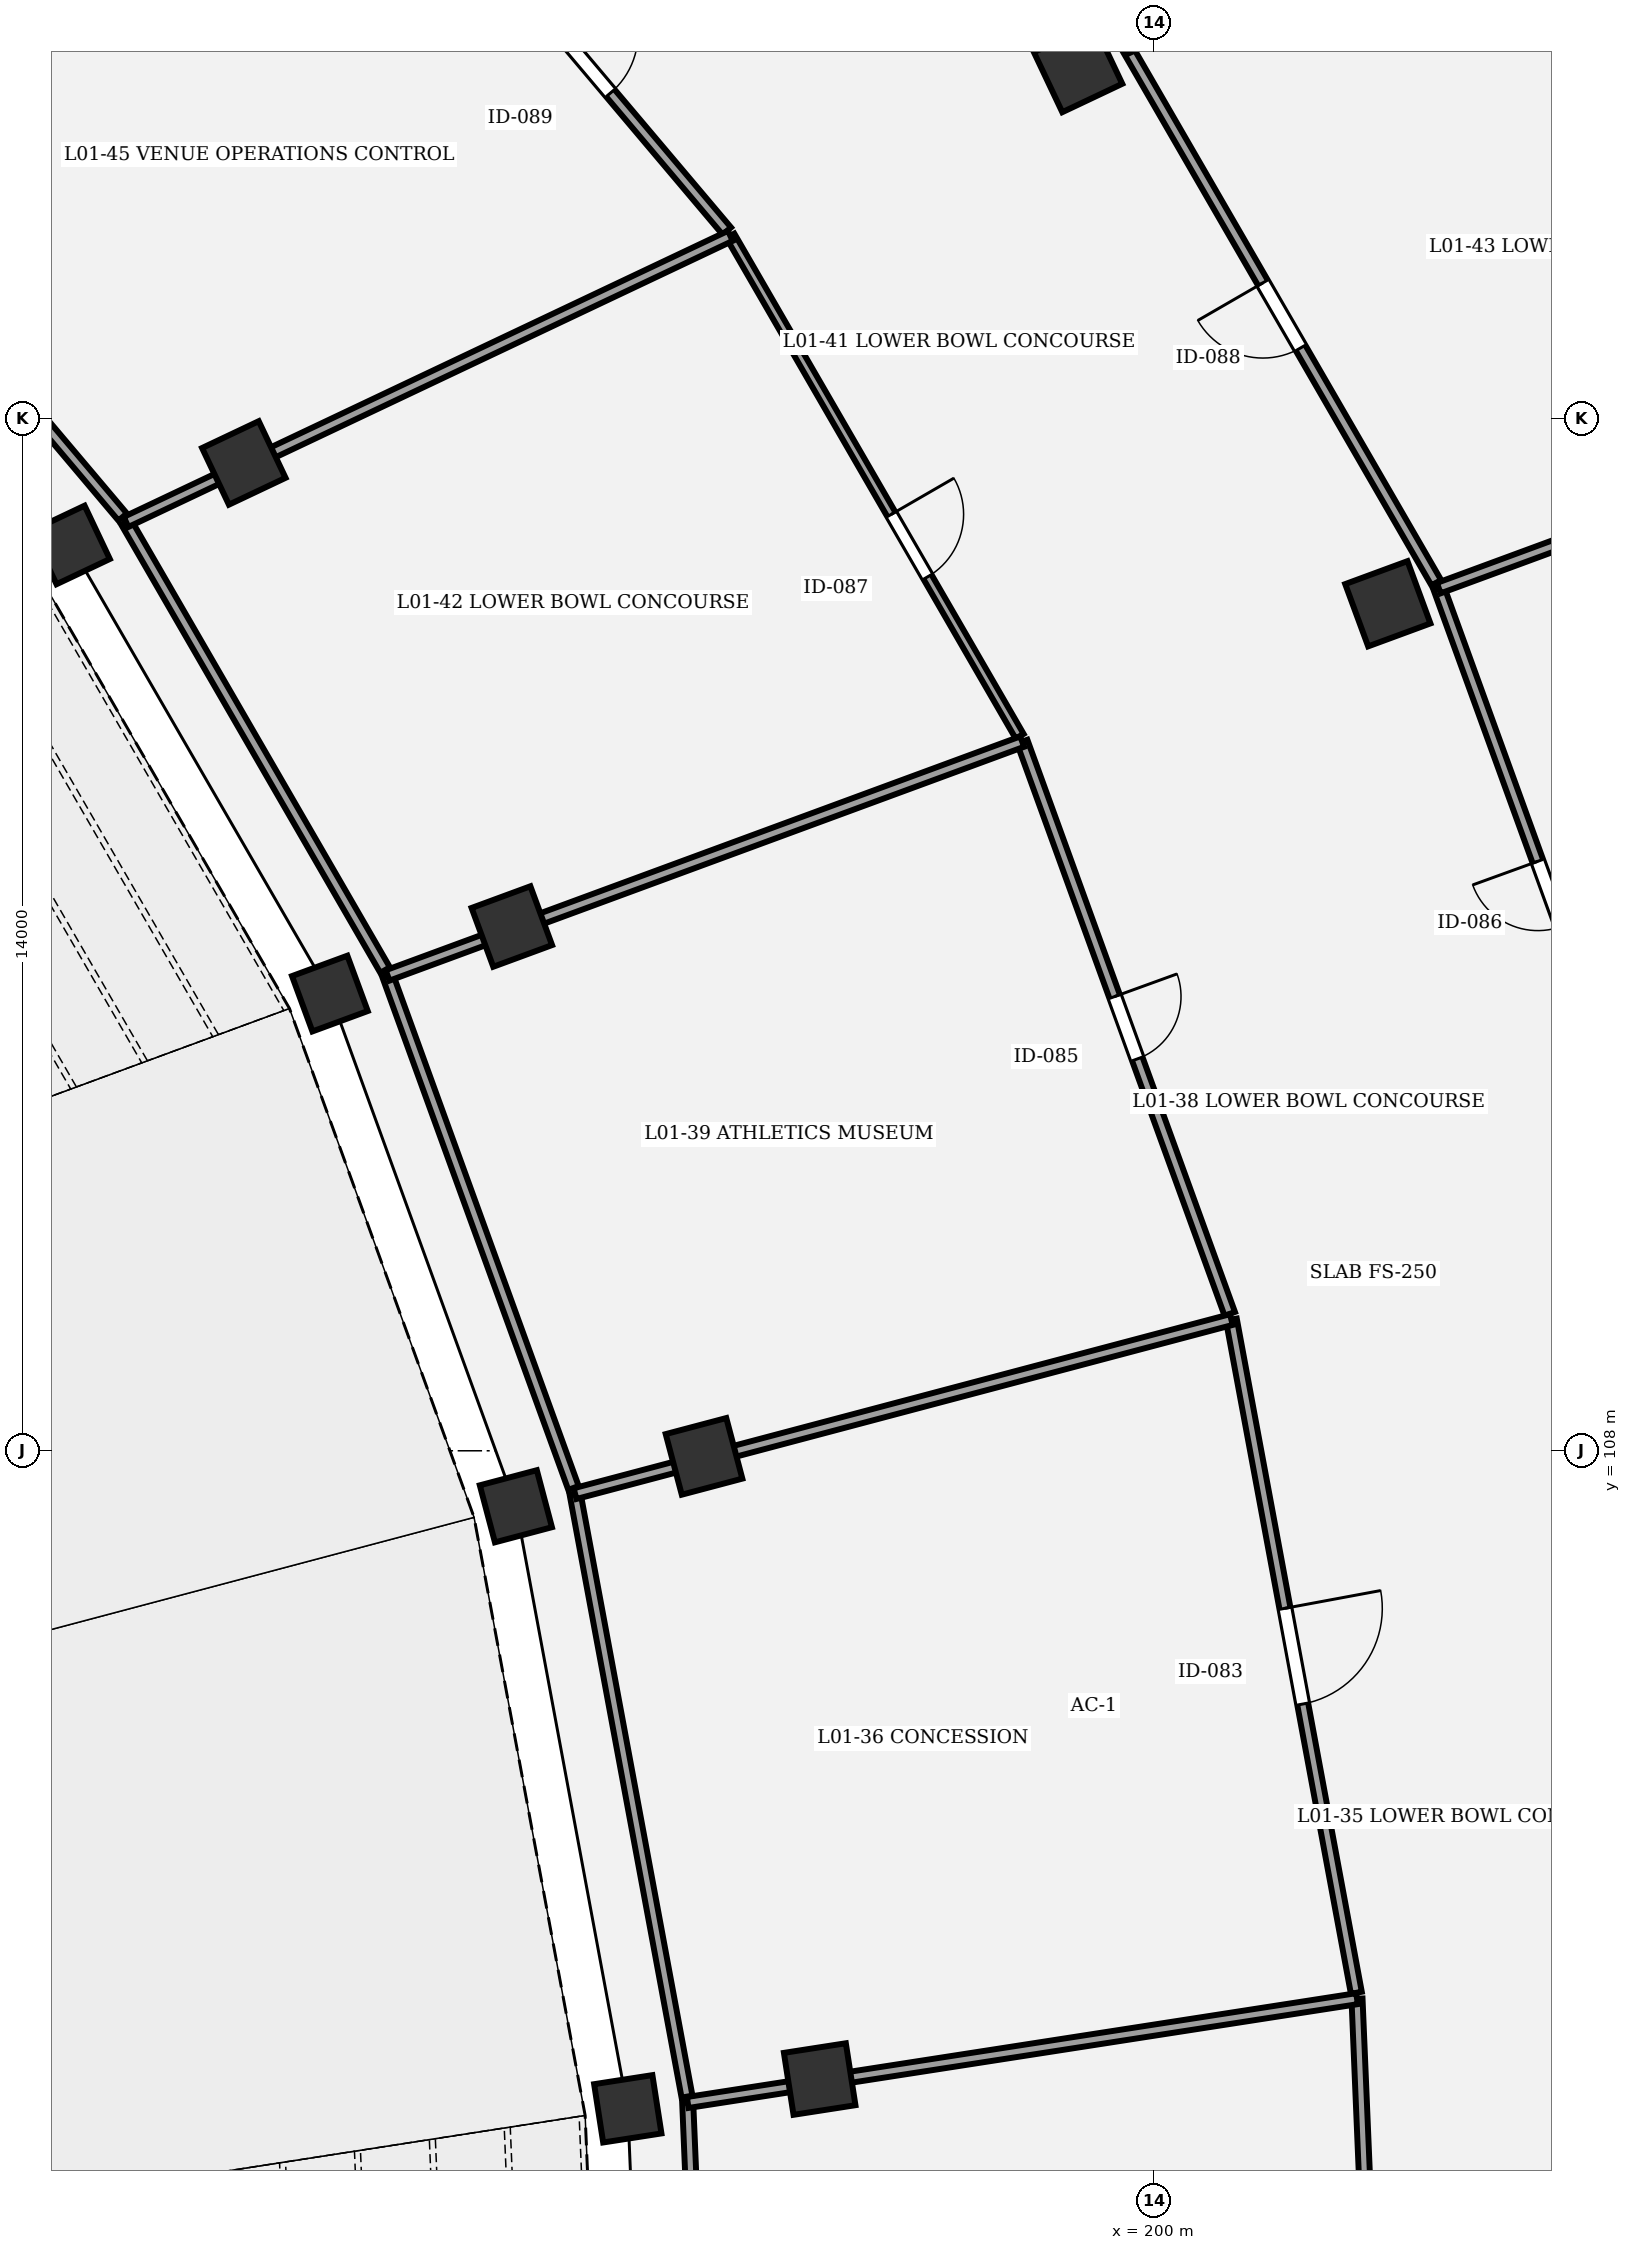
"""IFC4 building model, lengths in metres.
Left out: names, types, materials, properties, quantities, classifications, styles, units other than length and angle.
Written with IfcOpenShell. Run it as: python <this file> out.ifc"""

import sys

from ifc_helpers import new_model, si_unit, direction, frame, frame_2d, origin, origin_2d, place, context, subcontext, project, spatial, rectangle, extrude, element, fill, save


model = new_model("IFC4")
c1 = context("Model", 3, precision=1e-05, world=origin(), true_north=direction((0.0, 1.0)))
c2 = subcontext(c1, "Body", "Model", "MODEL_VIEW")
j1 = project(units=[si_unit("LENGTHUNIT", "METRE"), si_unit("PLANEANGLEUNIT", "RADIAN")], contexts=[c1])
p1 = place(None, origin())
s1 = spatial("IfcSite", under=j1, at=p1, CompositionType="ELEMENT")
p2 = place(p1, origin())
s2 = spatial("IfcBuilding", under=s1, at=p2, CompositionType="ELEMENT")
p3 = place(p2, frame((0.0, 0.0, 5.4)))
s3 = spatial("IfcBuildingStorey", under=s2, at=p3, CompositionType="ELEMENT", Elevation=5.4)
p4 = place(p3, frame((192.869, 99.078, 0.0), z_axis=(0.0, 0.0, 1.0), x_axis=(0.98817491911, 0.153330783737, 0.0)))
e1 = element("IfcColumn", 1, at=p4, inside=s3, PredefinedType="COLUMN", context=c2, shape_type="SweptSolid", body=[
    extrude(rectangle(XDim=0.8, YDim=0.8, at=origin_2d()), origin(), (0.0, 0.0, 1.0), 4.8),
])
p5 = place(p3, frame((195.471, 99.482, 0.0), z_axis=(0.0, 0.0, 1.0), x_axis=(0.98817491911, 0.153330783737, 0.0)))
e2 = element("IfcColumn", 2, at=p5, inside=s3, PredefinedType="COLUMN", context=c2, shape_type="SweptSolid", body=[
    extrude(rectangle(XDim=0.85, YDim=0.85, at=origin_2d()), origin(), (0.0, 0.0, 1.0), 4.8),
])
p6 = place(p3, frame((191.352, 107.248, 0.0), z_axis=(0.0, 0.0, 1.0), x_axis=(0.966600102017, 0.256289373133, 0.0)))
e3 = element("IfcColumn", 3, at=p6, inside=s3, PredefinedType="COLUMN", context=c2, shape_type="SweptSolid", body=[
    extrude(rectangle(XDim=0.8, YDim=0.8, at=origin_2d()), origin(), (0.0, 0.0, 1.0), 4.8),
])
p7 = place(p3, frame((193.903, 107.924, 0.0), z_axis=(0.0, 0.0, 1.0), x_axis=(0.966600102017, 0.256289373133, 0.0)))
e4 = element("IfcColumn", 4, at=p7, inside=s3, PredefinedType="COLUMN", context=c2, shape_type="SweptSolid", body=[
    extrude(rectangle(XDim=0.85, YDim=0.85, at=origin_2d()), origin(), (0.0, 0.0, 1.0), 4.8),
])
p8 = place(p3, frame((188.83, 114.199, 0.0), z_axis=(0.0, 0.0, 1.0), x_axis=(0.938372433776, 0.34562577382, 0.0)))
e5 = element("IfcColumn", 5, at=p8, inside=s3, PredefinedType="COLUMN", context=c2, shape_type="SweptSolid", body=[
    extrude(rectangle(XDim=0.8, YDim=0.8, at=origin_2d()), origin(), (0.0, 0.0, 1.0), 4.8),
])
p9 = place(p3, frame((191.297, 115.108, 0.0), z_axis=(0.0, 0.0, 1.0), x_axis=(0.938372433776, 0.34562577382, 0.0)))
e6 = element("IfcColumn", 6, at=p9, inside=s3, PredefinedType="COLUMN", context=c2, shape_type="SweptSolid", body=[
    extrude(rectangle(XDim=0.85, YDim=0.85, at=origin_2d()), origin(), (0.0, 0.0, 1.0), 4.8),
])
p10 = place(p3, frame((203.176, 119.484, 0.0), z_axis=(0.0, 0.0, 1.0), x_axis=(0.938372433776, 0.34562577382, 0.0)))
e7 = element("IfcColumn", 7, at=p10, inside=s3, PredefinedType="COLUMN", context=c2, shape_type="SweptSolid", body=[
    extrude(rectangle(XDim=0.9, YDim=0.9, at=origin_2d()), origin(), (0.0, 0.0, 1.0), 4.8),
])
p11 = place(p3, frame((185.313, 120.281, 0.0), z_axis=(0.0, 0.0, 1.0), x_axis=(0.903858661687, 0.4278311813, 0.0)))
e8 = element("IfcColumn", 8, at=p11, inside=s3, PredefinedType="COLUMN", context=c2, shape_type="SweptSolid", body=[
    extrude(rectangle(XDim=0.8, YDim=0.8, at=origin_2d()), origin(), (0.0, 0.0, 1.0), 4.8),
])
p12 = place(p3, frame((187.663, 121.394, 0.0), z_axis=(0.0, 0.0, 1.0), x_axis=(0.903858661687, 0.4278311813, 0.0)))
e9 = element("IfcColumn", 9, at=p12, inside=s3, PredefinedType="COLUMN", context=c2, shape_type="SweptSolid", body=[
    extrude(rectangle(XDim=0.85, YDim=0.85, at=origin_2d()), origin(), (0.0, 0.0, 1.0), 4.8),
])
p13 = place(p3, frame((198.976, 126.748, 0.0), z_axis=(0.0, 0.0, 1.0), x_axis=(0.903858661687, 0.4278311813, 0.0)))
e10 = element("IfcColumn", 10, at=p13, inside=s3, PredefinedType="COLUMN", context=c2, shape_type="SweptSolid", body=[
    extrude(rectangle(XDim=0.9, YDim=0.9, at=origin_2d()), origin(), (0.0, 0.0, 1.0), 4.8),
])
p14 = place(p3, frame((202.758, 100.571, 0.0), z_axis=(0.0, 0.0, 1.0), x_axis=(0.041894479342, -0.999122040894, 0.0)))
e11 = element("IfcWall", 11, at=p14, inside=s3, PredefinedType="PARTITIONING", context=c2, shape_type="SweptSolid", body=[
    extrude(rectangle(XDim=13.543, YDim=0.15, at=frame_2d((6.771, 0.0))), origin(), (0.0, 0.0, 1.0), 3.55),
])
p15 = place(p14, frame((6.142, 0.0, 0.0)))
e12 = element("IfcOpeningElement", 12, at=p15, cuts=e11, PredefinedType="OPENING", context=c2, shape_type="SweptSolid", body=[
    extrude(rectangle(XDim=1.26, YDim=2.1, at=frame_2d((0.63, 1.05))), frame((0.0, 0.085, 0.0), z_axis=(0.0, -1.0, 0.0), x_axis=(1.0, 0.0, 0.0)), (0.0, 0.0, 1.0), 0.17),
])
p16 = place(p3, frame((201.053, 109.779, 0.0), z_axis=(0.0, 0.0, 1.0), x_axis=(0.182600545941, -0.983187184936, 0.0)))
e13 = element("IfcWall", 13, at=p16, inside=s3, PredefinedType="PARTITIONING", context=c2, shape_type="SweptSolid", body=[
    extrude(rectangle(XDim=9.284, YDim=0.15, at=frame_2d((4.642, 0.0))), origin(), (0.0, 0.0, 1.0), 3.55),
])
p17 = place(p16, frame((3.982, 0.0, 0.0)))
e14 = element("IfcOpeningElement", 14, at=p17, cuts=e13, PredefinedType="OPENING", context=c2, shape_type="SweptSolid", body=[
    extrude(rectangle(XDim=1.32, YDim=2.1, at=frame_2d((0.66, 1.05))), frame((0.0, 0.085, 0.0), z_axis=(0.0, -1.0, 0.0), x_axis=(1.0, 0.0, 0.0)), (0.0, 0.0, 1.0), 0.17),
])
p18 = place(p3, frame((198.218, 117.615, 0.0), z_axis=(0.0, 0.0, 1.0), x_axis=(0.341044733968, -0.940047067669, 0.0)))
e15 = element("IfcWall", 15, at=p18, inside=s3, PredefinedType="PARTITIONING", context=c2, shape_type="SweptSolid", body=[
    extrude(rectangle(XDim=8.254, YDim=0.15, at=frame_2d((4.127, 0.0))), origin(), (0.0, 0.0, 1.0), 3.55),
])
p19 = place(p18, frame((3.677, 0.0, 0.0)))
e16 = element("IfcOpeningElement", 16, at=p19, cuts=e15, PredefinedType="OPENING", context=c2, shape_type="SweptSolid", body=[
    extrude(rectangle(XDim=0.9, YDim=2.2, at=frame_2d((0.45, 1.1))), frame((0.0, 0.085, 0.0), z_axis=(0.0, -1.0, 0.0), x_axis=(1.0, 0.0, 0.0)), (0.0, 0.0, 1.0), 0.17),
])
p20 = place(p3, frame((206.874, 111.405, 0.0), z_axis=(0.0, 0.0, 1.0), x_axis=(-0.341031741571, 0.940051781149, 0.0)))
e17 = element("IfcWall", 17, at=p20, inside=s3, PredefinedType="PARTITIONING", context=c2, shape_type="SweptSolid", body=[
    extrude(rectangle(XDim=8.82, YDim=0.15, at=frame_2d((4.41, 0.0))), origin(), (0.0, 0.0, 1.0), 3.55),
])
p21 = place(p20, frame((3.94, 0.0, 0.0)))
e18 = element("IfcOpeningElement", 18, at=p21, cuts=e17, PredefinedType="OPENING", context=c2, shape_type="SweptSolid", body=[
    extrude(rectangle(XDim=0.94, YDim=2.2, at=frame_2d((0.47, 1.1))), frame((0.0, 0.085, 0.0), z_axis=(0.0, -1.0, 0.0), x_axis=(1.0, 0.0, 0.0)), (0.0, 0.0, 1.0), 0.17),
])
p22 = place(p3, frame((194.26, 124.472, 0.0), z_axis=(0.0, 0.0, 1.0), x_axis=(0.500584301803, -0.865687794063, 0.0)))
e19 = element("IfcWall", 19, at=p22, inside=s3, PredefinedType="PARTITIONING", context=c2, shape_type="SweptSolid", body=[
    extrude(rectangle(XDim=7.837, YDim=0.125, at=frame_2d((3.918, 0.0))), origin(), (0.0, 0.0, 1.0), 3.55),
])
p23 = place(p22, frame((4.361, 0.0, 0.0)))
e20 = element("IfcOpeningElement", 20, at=p23, cuts=e19, PredefinedType="OPENING", context=c2, shape_type="SweptSolid", body=[
    extrude(rectangle(XDim=0.98, YDim=2.2, at=frame_2d((0.49, 1.1))), frame((0.0, 0.073, 0.0), z_axis=(0.0, -1.0, 0.0), x_axis=(1.0, 0.0, 0.0)), (0.0, 0.0, 1.0), 0.145),
])
p24 = place(p3, frame((203.833, 119.769, 0.0), z_axis=(0.0, 0.0, 1.0), x_axis=(-0.500559280672, 0.865702262059, 0.0)))
e21 = element("IfcWall", 21, at=p24, inside=s3, PredefinedType="PARTITIONING", context=c2, shape_type="SweptSolid", body=[
    extrude(rectangle(XDim=8.375, YDim=0.15, at=frame_2d((4.187, 0.0))), origin(), (0.0, 0.0, 1.0), 3.55),
])
p25 = place(p24, frame((3.677, 0.0, 0.0)))
e22 = element("IfcOpeningElement", 22, at=p25, cuts=e21, PredefinedType="OPENING", context=c2, shape_type="SweptSolid", body=[
    extrude(rectangle(XDim=1.02, YDim=2.2, at=frame_2d((0.51, 1.1))), frame((0.0, 0.085, 0.0), z_axis=(0.0, -1.0, 0.0), x_axis=(1.0, 0.0, 0.0)), (0.0, 0.0, 1.0), 0.17),
])
p26 = place(p3, frame((189.193, 130.482, 0.0), z_axis=(0.0, 0.0, 1.0), x_axis=(0.645180817826, -0.764029915847, 0.0)))
e23 = element("IfcWall", 23, at=p26, inside=s3, PredefinedType="PARTITIONING", context=c2, shape_type="SweptSolid", body=[
    extrude(rectangle(XDim=7.779, YDim=0.15, at=frame_2d((3.89, 0.0))), origin(), (0.0, 0.0, 1.0), 3.55),
])
p27 = place(p26, frame((4.271, 0.0, 0.0)))
e24 = element("IfcOpeningElement", 24, at=p27, cuts=e23, PredefinedType="OPENING", context=c2, shape_type="SweptSolid", body=[
    extrude(rectangle(XDim=1.06, YDim=2.2, at=frame_2d((0.53, 1.1))), frame((0.0, 0.085, 0.0), z_axis=(0.0, -1.0, 0.0), x_axis=(1.0, 0.0, 0.0)), (0.0, 0.0, 1.0), 0.17),
])
p28 = place(p3, frame((194.19, 87.04, 0.0), z_axis=(0.0, 0.0, 1.0), x_axis=(-0.041909219346, 0.999121422718, 0.0)))
e25 = element("IfcWall", 25, at=p28, inside=s3, PredefinedType="PARTITIONING", context=c2, shape_type="SweptSolid", body=[
    extrude(rectangle(XDim=12.135, YDim=0.15, at=frame_2d((6.067, 0.0))), origin(), (0.0, 0.0, 1.0), 3.55),
])
p29 = place(p3, frame((193.682, 99.164, 0.0), z_axis=(0.0, 0.0, 1.0), x_axis=(0.988188135357, 0.153245584407, 0.0)))
e26 = element("IfcWall", 26, at=p29, inside=s3, PredefinedType="PARTITIONING", context=c2, shape_type="SweptSolid", body=[
    extrude(rectangle(XDim=9.184, YDim=0.15, at=frame_2d((4.592, 0.0))), origin(), (0.0, 0.0, 1.0), 3.55),
])
p30 = place(p3, frame((193.673, 99.243, 0.0), z_axis=(0.0, 0.0, 1.0), x_axis=(-0.182614898171, 0.983184519287, 0.0)))
e27 = element("IfcWall", 27, at=p30, inside=s3, PredefinedType="PARTITIONING", context=c2, shape_type="SweptSolid", body=[
    extrude(rectangle(XDim=8.316, YDim=0.15, at=frame_2d((4.158, 0.0))), origin(), (0.0, 0.0, 1.0), 3.55),
])
p31 = place(p3, frame((192.154, 107.419, 0.0), z_axis=(0.0, 0.0, 1.0), x_axis=(0.96658744027, 0.256337122383, 0.0)))
e28 = element("IfcWall", 28, at=p31, inside=s3, PredefinedType="PARTITIONING", context=c2, shape_type="SweptSolid", body=[
    extrude(rectangle(XDim=9.207, YDim=0.15, at=frame_2d((4.604, 0.0))), origin(), (0.0, 0.0, 1.0), 3.55),
])
p32 = place(p3, frame((192.133, 107.496, 0.0), z_axis=(0.0, 0.0, 1.0), x_axis=(-0.34104817416, 0.940045819576, 0.0)))
e29 = element("IfcWall", 29, at=p32, inside=s3, PredefinedType="PARTITIONING", context=c2, shape_type="SweptSolid", body=[
    extrude(rectangle(XDim=7.392, YDim=0.15, at=frame_2d((3.696, 0.0))), origin(), (0.0, 0.0, 1.0), 3.55),
])
p33 = place(p3, frame((189.612, 114.445, 0.0), z_axis=(0.0, 0.0, 1.0), x_axis=(0.93834402583, 0.345702891496, 0.0)))
e30 = element("IfcWall", 30, at=p33, inside=s3, PredefinedType="PARTITIONING", context=c2, shape_type="SweptSolid", body=[
    extrude(rectangle(XDim=9.171, YDim=0.15, at=frame_2d((4.585, 0.0))), origin(), (0.0, 0.0, 1.0), 3.55),
])
p34 = place(p3, frame((203.866, 119.696, 0.0), z_axis=(0.0, 0.0, 1.0), x_axis=(0.938346807893, 0.345695340028, 0.0)))
e31 = element("IfcWall", 31, at=p34, inside=s3, PredefinedType="PARTITIONING", context=c2, shape_type="SweptSolid", body=[
    extrude(rectangle(XDim=7.905, YDim=0.15, at=frame_2d((3.952, 0.0))), origin(), (0.0, 0.0, 1.0), 3.55),
])
p35 = place(p3, frame((189.579, 114.518, 0.0), z_axis=(0.0, 0.0, 1.0), x_axis=(-0.500549390525, 0.865707980583, 0.0)))
e32 = element("IfcWall", 32, at=p35, inside=s3, PredefinedType="PARTITIONING", context=c2, shape_type="SweptSolid", body=[
    extrude(rectangle(XDim=7.018, YDim=0.15, at=frame_2d((3.509, 0.0))), origin(), (0.0, 0.0, 1.0), 3.55),
])
p36 = place(p3, frame((186.066, 120.594, 0.0), z_axis=(0.0, 0.0, 1.0), x_axis=(0.903860081227, 0.427828182292, 0.0)))
e33 = element("IfcWall", 33, at=p36, inside=s3, PredefinedType="PARTITIONING", context=c2, shape_type="SweptSolid", body=[
    extrude(rectangle(XDim=9.066, YDim=0.15, at=frame_2d((4.533, 0.0))), origin(), (0.0, 0.0, 1.0), 3.55),
])
p37 = place(p3, frame((199.641, 127.019, 0.0), z_axis=(0.0, 0.0, 1.0), x_axis=(0.903854859666, 0.427839213559, 0.0)))
e34 = element("IfcWall", 34, at=p37, inside=s3, PredefinedType="PARTITIONING", context=c2, shape_type="SweptSolid", body=[
    extrude(rectangle(XDim=7.814, YDim=0.15, at=frame_2d((3.907, 0.0))), origin(), (0.0, 0.0, 1.0), 3.55),
])
p38 = place(p3, frame((186.02, 120.66, 0.0), z_axis=(0.0, 0.0, 1.0), x_axis=(-0.64516899819, 0.764039896716, 0.0)))
e35 = element("IfcWall", 35, at=p38, inside=s3, PredefinedType="PARTITIONING", context=c2, shape_type="SweptSolid", body=[
    extrude(rectangle(XDim=6.967, YDim=0.15, at=frame_2d((3.483, 0.0))), origin(), (0.0, 0.0, 1.0), 3.55),
])
p39 = place(p3, frame((181.525, 125.983, 0.0), z_axis=(0.0, 0.0, 1.0), x_axis=(0.862518193496, 0.506026052579, 0.0)))
e36 = element("IfcWall", 36, at=p39, inside=s3, PredefinedType="PARTITIONING", context=c2, shape_type="SweptSolid", body=[
    extrude(rectangle(XDim=8.89, YDim=0.15, at=frame_2d((4.445, 0.0))), origin(), (0.0, 0.0, 1.0), 3.55),
])
p40 = place(p17, origin())
e37 = element("IfcDoor", 37, at=p40, inside=s3, OperationType="SINGLE_SWING_LEFT", PredefinedType="DOOR", context=c2, shape_type="SweptSolid", body=[
    extrude(rectangle(XDim=1.32, YDim=2.1, at=frame_2d((0.66, 1.05))), frame((0.0, 0.025, 0.0), z_axis=(0.0, -1.0, 0.0), x_axis=(1.0, 0.0, 0.0)), (0.0, 0.0, 1.0), 0.05),
])
fill(e14, e37)
p41 = place(p19, origin())
e38 = element("IfcDoor", 38, at=p41, inside=s3, OperationType="SINGLE_SWING_LEFT", PredefinedType="DOOR", context=c2, shape_type="SweptSolid", body=[
    extrude(rectangle(XDim=0.9, YDim=2.2, at=frame_2d((0.45, 1.1))), frame((0.0, 0.025, 0.0), z_axis=(0.0, -1.0, 0.0), x_axis=(1.0, 0.0, 0.0)), (0.0, 0.0, 1.0), 0.05),
])
fill(e16, e38)
p42 = place(p21, origin())
e39 = element("IfcDoor", 39, at=p42, inside=s3, OperationType="SINGLE_SWING_RIGHT", PredefinedType="DOOR", context=c2, shape_type="SweptSolid", body=[
    extrude(rectangle(XDim=0.94, YDim=2.2, at=frame_2d((0.47, 1.1))), frame((0.0, 0.025, 0.0), z_axis=(0.0, -1.0, 0.0), x_axis=(1.0, 0.0, 0.0)), (0.0, 0.0, 1.0), 0.05),
])
fill(e18, e39)
p43 = place(p23, origin())
e40 = element("IfcDoor", 40, at=p43, inside=s3, OperationType="SINGLE_SWING_LEFT", PredefinedType="DOOR", context=c2, shape_type="SweptSolid", body=[
    extrude(rectangle(XDim=0.98, YDim=2.2, at=frame_2d((0.49, 1.1))), frame((0.0, 0.025, 0.0), z_axis=(0.0, -1.0, 0.0), x_axis=(1.0, 0.0, 0.0)), (0.0, 0.0, 1.0), 0.05),
])
fill(e20, e40)
p44 = place(p25, origin())
e41 = element("IfcDoor", 41, at=p44, inside=s3, OperationType="SINGLE_SWING_RIGHT", PredefinedType="DOOR", context=c2, shape_type="SweptSolid", body=[
    extrude(rectangle(XDim=1.02, YDim=2.2, at=frame_2d((0.51, 1.1))), frame((0.0, 0.025, 0.0), z_axis=(0.0, -1.0, 0.0), x_axis=(1.0, 0.0, 0.0)), (0.0, 0.0, 1.0), 0.05),
])
fill(e22, e41)
p45 = place(p27, origin())
e42 = element("IfcDoor", 42, at=p45, inside=s3, OperationType="SINGLE_SWING_LEFT", PredefinedType="DOOR", context=c2, shape_type="SweptSolid", body=[
    extrude(rectangle(XDim=1.06, YDim=2.2, at=frame_2d((0.53, 1.1))), frame((0.0, 0.025, 0.0), z_axis=(0.0, -1.0, 0.0), x_axis=(1.0, 0.0, 0.0)), (0.0, 0.0, 1.0), 0.05),
])
fill(e24, e42)
save(model, sys.argv[1])
